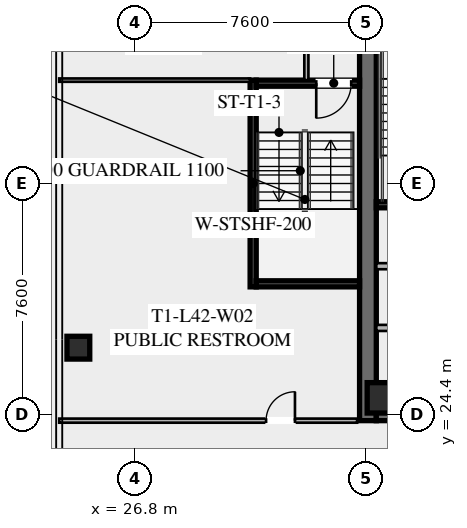
"""IFC4 building model, lengths in metres.
Left out: names, types, materials, properties, quantities, classifications, styles, units other than length and angle.
Written with IfcOpenShell. Run it as: python <this file> out.ifc"""

import sys

from ifc_helpers import new_model, si_unit, direction, frame, frame_2d, origin, origin_2d, place, context, subcontext, project, spatial, rectangle, hollow_rectangle, extrude, element, fill, save


model = new_model("IFC4")
c1 = context("Model", 3, precision=1e-05, world=origin(), true_north=direction((0.0, 1.0)))
c2 = subcontext(c1, "Body", "Model", "MODEL_VIEW")
j1 = project(units=[si_unit("LENGTHUNIT", "METRE"), si_unit("PLANEANGLEUNIT", "RADIAN")], contexts=[c1])
p1 = place(None, origin())
s1 = spatial("IfcSite", under=j1, at=p1, CompositionType="ELEMENT")
p2 = place(p1, origin())
s2 = spatial("IfcBuilding", under=s1, at=p2, CompositionType="ELEMENT")
p3 = place(p2, frame((0.0, 0.0, 157.0)))
s3 = spatial("IfcBuildingStorey", under=s2, at=p3, CompositionType="ELEMENT", Elevation=157.0)
p4 = place(p3, frame((34.475, 24.2, 0.0), z_axis=(0.0, 0.0, 1.0), x_axis=(0.0, 1.0, 0.0)))
e1 = element("IfcWall", 1, at=p4, inside=s3, PredefinedType="SHEAR", context=c2, shape_type="SweptSolid", body=[
    extrude(rectangle(XDim=15.6, YDim=0.55, at=frame_2d((7.8, 0.0))), origin(), (0.0, 0.0, 1.0), 3.55),
])
p5 = place(p3, frame((49.25, 24.475, 0.0), z_axis=(0.0, 0.0, 1.0), x_axis=(-1.0, 0.0, 0.0)))
e2 = element("IfcWall", 2, at=p5, inside=s3, PredefinedType="SHEAR", context=c2, shape_type="SweptSolid", body=[
    extrude(rectangle(XDim=14.5, YDim=0.55, at=frame_2d((7.25, 0.0))), origin(), (0.0, 0.0, 1.0), 3.55),
])
p6 = place(p5, frame((8.95, 0.0, 0.0)))
e3 = element("IfcOpeningElement", 3, at=p6, cuts=e2, PredefinedType="OPENING", context=c2, shape_type="SweptSolid", body=[
    extrude(rectangle(XDim=1.25, YDim=2.25, at=frame_2d((0.625, 1.125))), frame((0.0, 0.285, 0.0), z_axis=(0.0, -1.0, 0.0), x_axis=(1.0, 0.0, 0.0)), (0.0, 0.0, 1.0), 0.57),
])
p7 = place(p5, frame((3.9, 0.0, 0.0)))
e4 = element("IfcOpeningElement", 4, at=p7, cuts=e2, PredefinedType="OPENING", context=c2, shape_type="SweptSolid", body=[
    extrude(rectangle(XDim=1.25, YDim=2.25, at=frame_2d((0.625, 1.125))), frame((0.0, 0.285, 0.0), z_axis=(0.0, -1.0, 0.0), x_axis=(1.0, 0.0, 0.0)), (0.0, 0.0, 1.0), 0.57),
])
p8 = place(p3, frame((34.95, 24.95, 0.0), z_axis=(0.0, 0.0, 1.0), x_axis=(1.0, 0.0, 0.0)))
e5 = element("IfcColumn", 5, at=p8, inside=s3, PredefinedType="COLUMN", context=c2, shape_type="SweptSolid", body=[
    extrude(hollow_rectangle(XDim=1.0, YDim=1.0, WallThickness=0.04, at=origin_2d()), origin(), (0.0, 0.0, 1.0), 3.37),
])
p9 = place(p3, frame((24.95, 26.6, -0.175), z_axis=(0.0, 0.0, 1.0), x_axis=(1.0, 0.0, 0.0)))
e6 = element("IfcColumn", 6, at=p9, inside=s3, PredefinedType="COLUMN", context=c2, shape_type="SweptSolid", body=[
    extrude(hollow_rectangle(XDim=0.75, YDim=0.75, WallThickness=0.032, at=origin_2d()), origin(), (0.0, 0.0, 1.0), 3.545),
])
p10 = place(p3, frame((34.75, 31.3, 0.0), z_axis=(0.0, 0.0, 1.0), x_axis=(1.0, 0.0, 0.0)))
e7 = element("IfcWall", 7, at=p10, inside=s3, PredefinedType="SHEAR", context=c2, shape_type="SweptSolid", body=[
    extrude(rectangle(XDim=3.55, YDim=0.2, at=frame_2d((1.775, 0.0))), origin(), (0.0, 0.0, 1.0), 3.37),
])
for number, where, z_axis, x_axis in (
    (8, (34.75, 27.25, 0.0), (0.0, 0.0, 1.0), (1.0, 0.0, 0.0)),
    (9, (34.75, 29.28, 0.0), (0.0, 0.0, 1.0), (1.0, 0.0, 0.0)),
):
    element("IfcWall", number, at=place(p3, frame(where, z_axis=z_axis, x_axis=x_axis)), inside=s3, PredefinedType="SOLIDWALL", context=c2, shape_type="SweptSolid", body=[
        extrude(rectangle(XDim=3.2, YDim=0.2, at=frame_2d((1.6, 0.0))), origin(), (0.0, 0.0, 1.0), 3.37),
    ])
p11 = place(p3, frame((30.7, 28.6, 0.0), z_axis=(0.0, 0.0, 1.0), x_axis=(0.0, 1.0, 0.0)))
e10 = element("IfcWall", 10, at=p11, inside=s3, PredefinedType="SHEAR", context=c2, shape_type="SweptSolid", body=[
    extrude(rectangle(XDim=6.8, YDim=0.2, at=frame_2d((3.4, 0.0))), origin(), (0.0, 0.0, 1.0), 3.37),
])
p12 = place(p3, frame((34.2, 35.3, 0.0), z_axis=(0.0, 0.0, 1.0), x_axis=(-1.0, 0.0, 0.0)))
e11 = element("IfcWall", 11, at=p12, inside=s3, PredefinedType="SHEAR", context=c2, shape_type="SweptSolid", body=[
    extrude(rectangle(XDim=3.4, YDim=0.2, at=frame_2d((1.7, 0.0))), origin(), (0.0, 0.0, 1.0), 3.37),
])
p13 = place(p12, frame((0.275, 0.0, 0.0)))
e12 = element("IfcOpeningElement", 12, at=p13, cuts=e11, PredefinedType="OPENING", context=c2, shape_type="SweptSolid", body=[
    extrude(rectangle(XDim=1.15, YDim=2.2, at=frame_2d((0.575, 1.1))), frame((0.0, 0.11, 0.0), z_axis=(0.0, -1.0, 0.0), x_axis=(1.0, 0.0, 0.0)), (0.0, 0.0, 1.0), 0.22),
])
p14 = place(p3, frame((30.8, 28.7, 0.0), z_axis=(0.0, 0.0, 1.0), x_axis=(1.0, 0.0, 0.0)))
e13 = element("IfcWall", 13, at=p14, inside=s3, PredefinedType="SHEAR", context=c2, shape_type="SweptSolid", body=[
    extrude(rectangle(XDim=3.4, YDim=0.2, at=frame_2d((1.7, 0.0))), origin(), (0.0, 0.0, 1.0), 3.37),
])
p15 = place(p3, frame((32.45, 35.4, 0.0), z_axis=(0.0, 0.0, 1.0), x_axis=(0.0, 1.0, 0.0)))
e14 = element("IfcWall", 14, at=p15, inside=s3, PredefinedType="PARTITIONING", context=c2, shape_type="SweptSolid", body=[
    extrude(rectangle(XDim=4.4, YDim=0.135, at=frame_2d((2.2, 0.0))), origin(), (0.0, 0.0, 1.0), 2.723),
])
p16 = place(p3, frame((24.32, 24.2, 0.0), z_axis=(0.0, 0.0, 1.0), x_axis=(1.0, 0.0, 0.0)))
e15 = element("IfcWall", 15, at=p16, inside=s3, PredefinedType="PARTITIONING", context=c2, shape_type="SweptSolid", body=[
    extrude(rectangle(XDim=9.8, YDim=0.135, at=frame_2d((4.9, 0.0))), origin(), (0.0, 0.0, 1.0), 2.723),
])
p17 = place(p16, frame((6.805, 0.0, 0.0)))
e16 = element("IfcOpeningElement", 16, at=p17, cuts=e15, PredefinedType="OPENING", context=c2, shape_type="SweptSolid", body=[
    extrude(rectangle(XDim=0.95, YDim=2.05, at=frame_2d((0.475, 1.025))), frame((0.0, 0.077, 0.0), z_axis=(0.0, -1.0, 0.0), x_axis=(1.0, 0.0, 0.0)), (0.0, 0.0, 1.0), 0.155),
])
p18 = place(p3, frame((30.6, 35.4, 0.0), z_axis=(0.0, 0.0, 1.0), x_axis=(-1.0, 0.0, 0.0)))
e17 = element("IfcWall", 17, at=p18, inside=s3, PredefinedType="PARTITIONING", context=c2, shape_type="SweptSolid", body=[
    extrude(rectangle(XDim=6.28, YDim=0.11, at=frame_2d((3.14, 0.0))), origin(), (0.0, 0.0, 1.0), 2.723),
])
p19 = place(p13, origin())
e18 = element("IfcDoor", 18, at=p19, inside=s3, OperationType="SINGLE_SWING_RIGHT", PredefinedType="DOOR", context=c2, shape_type="SweptSolid", body=[
    extrude(rectangle(XDim=1.15, YDim=2.2, at=frame_2d((0.575, 1.1))), frame((0.0, 0.025, 0.0), z_axis=(0.0, -1.0, 0.0), x_axis=(1.0, 0.0, 0.0)), (0.0, 0.0, 1.0), 0.05),
])
fill(e12, e18)
p20 = place(p17, origin())
e19 = element("IfcDoor", 19, at=p20, inside=s3, OperationType="SINGLE_SWING_RIGHT", PredefinedType="DOOR", context=c2, shape_type="SweptSolid", body=[
    extrude(rectangle(XDim=0.95, YDim=2.05, at=frame_2d((0.475, 1.025))), frame((0.0, 0.025, 0.0), z_axis=(0.0, -1.0, 0.0), x_axis=(1.0, 0.0, 0.0)), (0.0, 0.0, 1.0), 0.05),
])
fill(e16, e19)
save(model, sys.argv[1])
